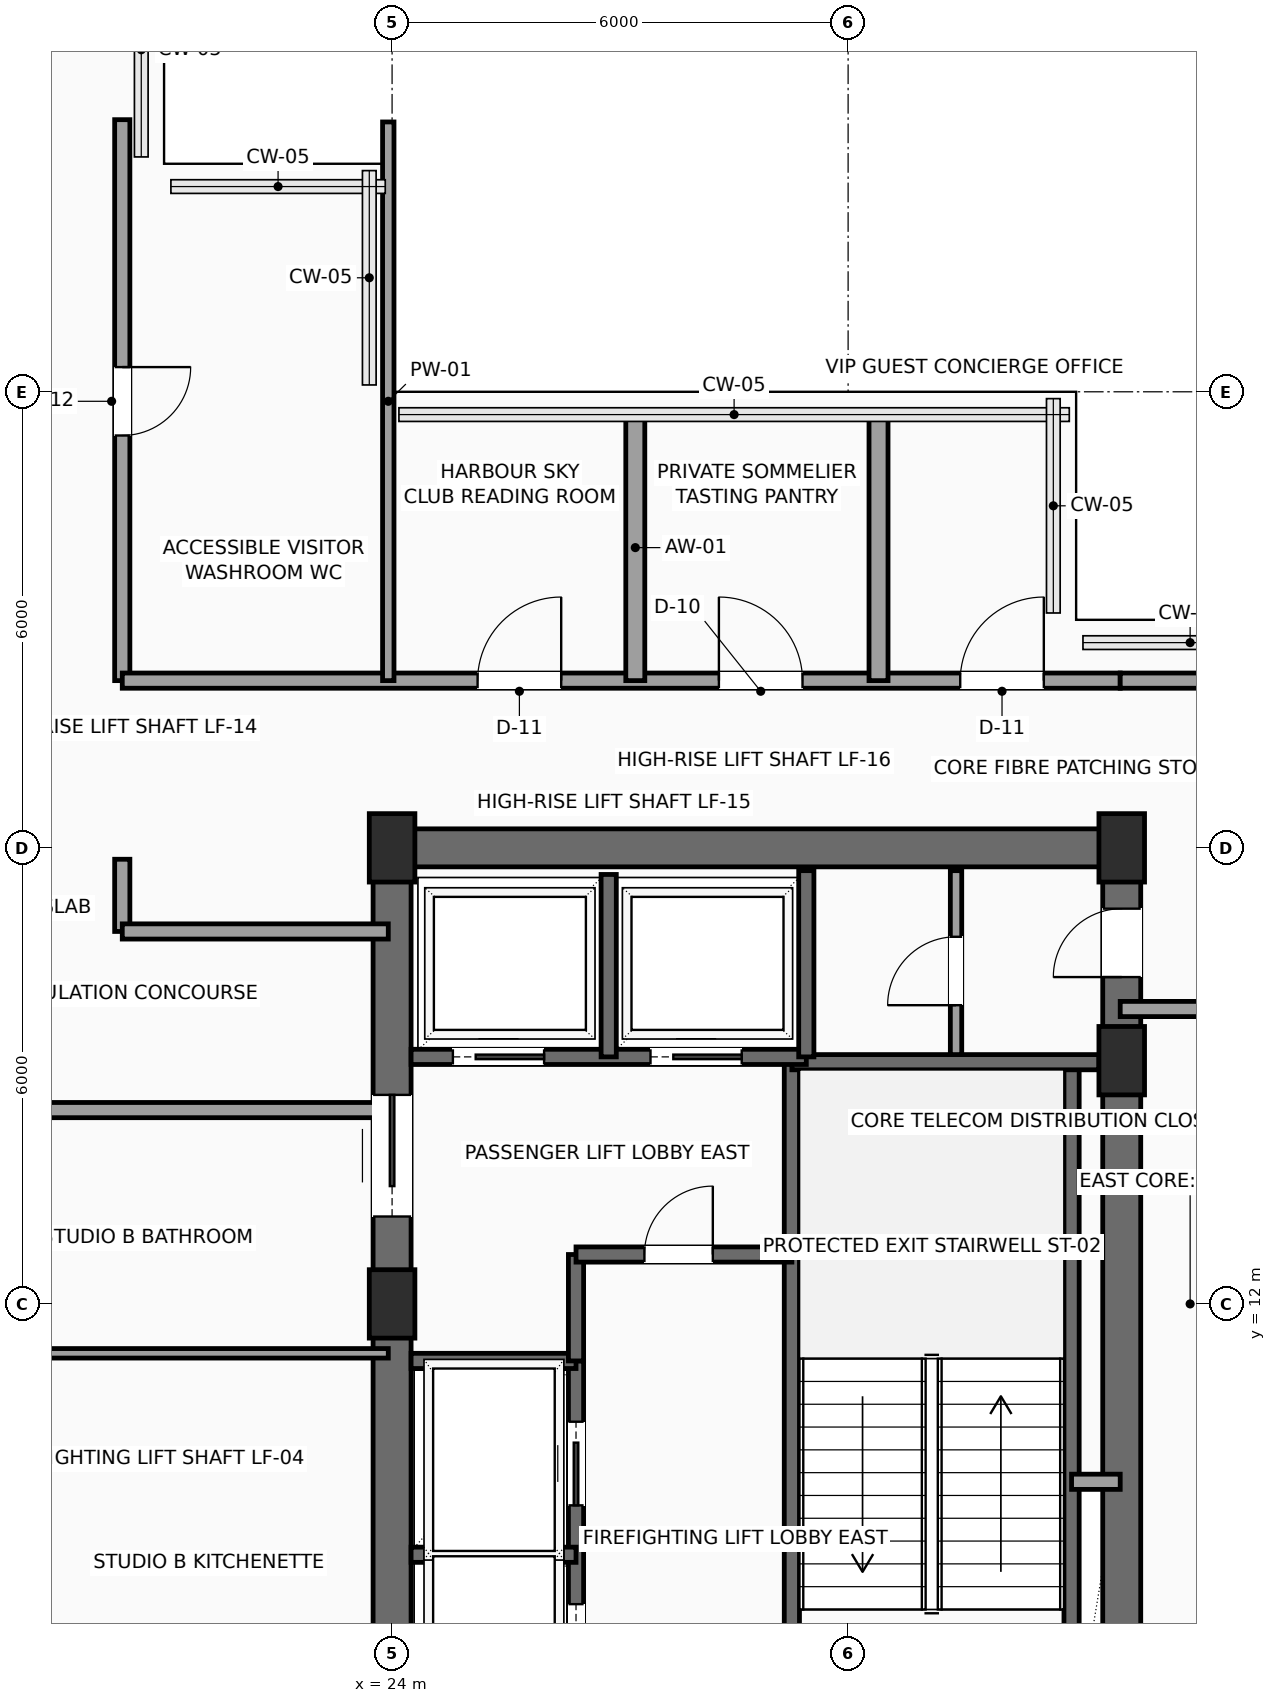
"""IFC4 building model, lengths in metres.
Left out: names, types, materials, properties, quantities, classifications, styles, units other than length and angle.
Written with IfcOpenShell. Run it as: python <this file> out.ifc"""

import sys

from ifc_helpers import new_model, si_unit, direction, frame, frame_2d, origin, origin_2d, place, context, subcontext, project, spatial, rectangle, extrude, element, fill, save


model = new_model("IFC4")
c1 = context("Model", 3, precision=1e-05, world=origin(), true_north=direction((0.0, 1.0)))
c2 = subcontext(c1, "Body", "Model", "MODEL_VIEW")
j1 = project(units=[si_unit("LENGTHUNIT", "METRE"), si_unit("PLANEANGLEUNIT", "RADIAN")], contexts=[c1])
p1 = place(None, origin())
s1 = spatial("IfcSite", under=j1, at=p1, CompositionType="ELEMENT")
p2 = place(p1, origin())
s2 = spatial("IfcBuilding", under=s1, at=p2, CompositionType="ELEMENT")
p3 = place(p2, frame((0.0, 0.0, 246.7)))
s3 = spatial("IfcBuildingStorey", under=s2, at=p3, CompositionType="ELEMENT", Elevation=246.7)
for number, where, z_axis, x_axis in (
    (1, (24.0, 12.0, 0.0), (0.0, 0.0, 1.0), (1.0, 0.0, 0.0)),
    (2, (24.0, 18.0, 0.0), (0.0, 0.0, 1.0), (1.0, 0.0, 0.0)),
    (3, (33.6, 15.2, 0.0), (0.0, 0.0, 1.0), (1.0, 0.0, 0.0)),
    (4, (33.6, 18.0, 0.0), (0.0, 0.0, 1.0), (1.0, 0.0, 0.0)),
):
    element("IfcColumn", number, at=place(p3, frame(where, z_axis=z_axis, x_axis=x_axis)), inside=s3, PredefinedType="COLUMN", context=c2, shape_type="SweptSolid", body=[
        extrude(rectangle(XDim=0.6, YDim=0.9, at=origin_2d()), origin(), (0.0, 0.0, 1.0), 3.5),
    ])
p4 = place(p3, frame((24.0, 18.0, 0.0), z_axis=(0.0, 0.0, 1.0), x_axis=(1.0, 0.0, 0.0)))
e5 = element("IfcWall", 5, at=p4, inside=s3, PredefinedType="SHEAR", context=c2, shape_type="SweptSolid", body=[
    extrude(rectangle(XDim=9.6, YDim=0.5, at=frame_2d((4.8, 0.0))), origin(), (0.0, 0.0, 1.0), 3.3),
])
p5 = place(p3, frame((24.0, 6.0, 0.0), z_axis=(0.0, 0.0, 1.0), x_axis=(0.0, 1.0, 0.0)))
e6 = element("IfcWall", 6, at=p5, inside=s3, PredefinedType="SHEAR", context=c2, shape_type="SweptSolid", body=[
    extrude(rectangle(XDim=12.0, YDim=0.5, at=frame_2d((6.0, 0.0))), origin(), (0.0, 0.0, 1.0), 3.3),
])
p6 = place(p5, frame((7.15, 0.0, 0.0)))
e7 = element("IfcOpeningElement", 7, at=p6, cuts=e6, PredefinedType="OPENING", context=c2, shape_type="SweptSolid", body=[
    extrude(rectangle(XDim=1.6, YDim=2.3, at=frame_2d((0.8, 1.15))), frame((0.0, 0.26, 0.0), z_axis=(0.0, -1.0, 0.0), x_axis=(1.0, 0.0, 0.0)), (0.0, 0.0, 1.0), 0.52),
])
p7 = place(p3, frame((33.6, 6.0, 0.0), z_axis=(0.0, 0.0, 1.0), x_axis=(0.0, 1.0, 0.0)))
e8 = element("IfcWall", 8, at=p7, inside=s3, PredefinedType="SHEAR", context=c2, shape_type="SweptSolid", body=[
    extrude(rectangle(XDim=12.0, YDim=0.5, at=frame_2d((6.0, 0.0))), origin(), (0.0, 0.0, 1.0), 3.3),
])
p8 = place(p7, frame((10.3, 0.0, 0.0)))
e9 = element("IfcOpeningElement", 9, at=p8, cuts=e8, PredefinedType="OPENING", context=c2, shape_type="SweptSolid", body=[
    extrude(rectangle(XDim=0.9, YDim=2.15, at=frame_2d((0.45, 1.075))), frame((0.0, 0.26, 0.0), z_axis=(0.0, -1.0, 0.0), x_axis=(1.0, 0.0, 0.0)), (0.0, 0.0, 1.0), 0.52),
])
p9 = place(p3, frame((29.26, 6.3, 0.0), z_axis=(0.0, 0.0, 1.0), x_axis=(0.0, 1.0, 0.0)))
e10 = element("IfcWall", 10, at=p9, inside=s3, PredefinedType="SHEAR", context=c2, shape_type="SweptSolid", body=[
    extrude(rectangle(XDim=8.88, YDim=0.2, at=frame_2d((4.44, 0.0))), origin(), (0.0, 0.0, 1.0), 3.3),
])
p10 = place(p9, frame((0.35, 0.0, 0.0)))
e11 = element("IfcOpeningElement", 11, at=p10, cuts=e10, PredefinedType="OPENING", context=c2, shape_type="SweptSolid", body=[
    extrude(rectangle(XDim=1.1, YDim=2.2, at=frame_2d((0.55, 1.1))), frame((0.0, 0.11, 0.0), z_axis=(0.0, -1.0, 0.0), x_axis=(1.0, 0.0, 0.0)), (0.0, 0.0, 1.0), 0.22),
])
p11 = place(p3, frame((32.94, 6.3, 0.0), z_axis=(0.0, 0.0, 1.0), x_axis=(0.0, 1.0, 0.0)))
e12 = element("IfcWall", 12, at=p11, inside=s3, PredefinedType="SHEAR", context=c2, shape_type="SweptSolid", body=[
    extrude(rectangle(XDim=8.88, YDim=0.2, at=frame_2d((4.44, 0.0))), origin(), (0.0, 0.0, 1.0), 3.3),
])
p12 = place(p3, frame((29.26, 15.18, 0.0), z_axis=(0.0, 0.0, 1.0), x_axis=(1.0, 0.0, 0.0)))
e13 = element("IfcWall", 13, at=p12, inside=s3, PredefinedType="SHEAR", context=c2, shape_type="SweptSolid", body=[
    extrude(rectangle(XDim=4.04, YDim=0.2, at=frame_2d((2.02, 0.0))), origin(), (0.0, 0.0, 1.0), 3.3),
])
p13 = place(p3, frame((26.42, 6.3, 0.0), z_axis=(0.0, 0.0, 1.0), x_axis=(0.0, 1.0, 0.0)))
e14 = element("IfcWall", 14, at=p13, inside=s3, PredefinedType="SHEAR", context=c2, shape_type="SweptSolid", body=[
    extrude(rectangle(XDim=4.95, YDim=0.2, at=frame_2d((2.475, 0.0))), origin(), (0.0, 0.0, 1.0), 3.3),
])
p14 = place(p13, frame((0.65, 0.0, 0.0)))
e15 = element("IfcOpeningElement", 15, at=p14, cuts=e14, PredefinedType="OPENING", context=c2, shape_type="SweptSolid", body=[
    extrude(rectangle(XDim=1.1, YDim=2.2, at=frame_2d((0.55, 1.1))), frame((0.0, 0.11, 0.0), z_axis=(0.0, -1.0, 0.0), x_axis=(1.0, 0.0, 0.0)), (0.0, 0.0, 1.0), 0.22),
])
p15 = place(p13, frame((3.05, 0.0, 0.0)))
e16 = element("IfcOpeningElement", 16, at=p15, cuts=e14, PredefinedType="OPENING", context=c2, shape_type="SweptSolid", body=[
    extrude(rectangle(XDim=1.1, YDim=2.2, at=frame_2d((0.55, 1.1))), frame((0.0, 0.11, 0.0), z_axis=(0.0, -1.0, 0.0), x_axis=(1.0, 0.0, 0.0)), (0.0, 0.0, 1.0), 0.22),
])
for number, where, z_axis, x_axis in (
    (17, (24.25, 8.7, 0.0), (0.0, 0.0, 1.0), (1.0, 0.0, 0.0)),
    (18, (24.25, 11.25, 0.0), (0.0, 0.0, 1.0), (1.0, 0.0, 0.0)),
):
    element("IfcWall", number, at=place(p3, frame(where, z_axis=z_axis, x_axis=x_axis)), inside=s3, PredefinedType="SHEAR", context=c2, shape_type="SweptSolid", body=[
        extrude(rectangle(XDim=2.17, YDim=0.2, at=frame_2d((1.085, 0.0))), origin(), (0.0, 0.0, 1.0), 3.3),
    ])
p16 = place(p3, frame((26.42, 11.25, 0.0), z_axis=(0.0, 0.0, 1.0), x_axis=(0.0, 1.0, 0.0)))
e19 = element("IfcWall", 19, at=p16, inside=s3, PredefinedType="SHEAR", context=c2, shape_type="SweptSolid", body=[
    extrude(rectangle(XDim=1.4, YDim=0.2, at=frame_2d((0.7, 0.0))), origin(), (0.0, 0.0, 1.0), 3.3),
])
p17 = place(p3, frame((26.42, 12.65, 0.0), z_axis=(0.0, 0.0, 1.0), x_axis=(1.0, 0.0, 0.0)))
e20 = element("IfcWall", 20, at=p17, inside=s3, PredefinedType="SHEAR", context=c2, shape_type="SweptSolid", body=[
    extrude(rectangle(XDim=2.84, YDim=0.2, at=frame_2d((1.42, 0.0))), origin(), (0.0, 0.0, 1.0), 3.3),
])
p18 = place(p17, frame((0.9, 0.0, 0.0)))
e21 = element("IfcOpeningElement", 21, at=p18, cuts=e20, PredefinedType="OPENING", context=c2, shape_type="SweptSolid", body=[
    extrude(rectangle(XDim=0.9, YDim=2.15, at=frame_2d((0.45, 1.075))), frame((0.0, 0.11, 0.0), z_axis=(0.0, -1.0, 0.0), x_axis=(1.0, 0.0, 0.0)), (0.0, 0.0, 1.0), 0.22),
])
p19 = place(p3, frame((32.94, 9.66, 0.0), z_axis=(0.0, 0.0, 1.0), x_axis=(1.0, 0.0, 0.0)))
e22 = element("IfcWall", 22, at=p19, inside=s3, PredefinedType="SOLIDWALL", context=c2, shape_type="SweptSolid", body=[
    extrude(rectangle(XDim=0.64, YDim=0.2, at=frame_2d((0.32, 0.0))), origin(), (0.0, 0.0, 1.0), 3.3),
])
p20 = place(p3, frame((24.25, 15.25, 0.0), z_axis=(0.0, 0.0, 1.0), x_axis=(1.0, 0.0, 0.0)))
e23 = element("IfcWall", 23, at=p20, inside=s3, PredefinedType="SHEAR", context=c2, shape_type="SweptSolid", body=[
    extrude(rectangle(XDim=5.2, YDim=0.2, at=frame_2d((2.6, 0.0))), origin(), (0.0, 0.0, 1.0), 3.3),
])
p21 = place(p20, frame((0.55, 0.0, 0.0)))
e24 = element("IfcOpeningElement", 24, at=p21, cuts=e23, PredefinedType="OPENING", context=c2, shape_type="SweptSolid", body=[
    extrude(rectangle(XDim=1.2, YDim=2.2, at=frame_2d((0.6, 1.1))), frame((0.0, 0.11, 0.0), z_axis=(0.0, -1.0, 0.0), x_axis=(1.0, 0.0, 0.0)), (0.0, 0.0, 1.0), 0.22),
])
p22 = place(p20, frame((3.15, 0.0, 0.0)))
e25 = element("IfcOpeningElement", 25, at=p22, cuts=e23, PredefinedType="OPENING", context=c2, shape_type="SweptSolid", body=[
    extrude(rectangle(XDim=1.2, YDim=2.2, at=frame_2d((0.6, 1.1))), frame((0.0, 0.11, 0.0), z_axis=(0.0, -1.0, 0.0), x_axis=(1.0, 0.0, 0.0)), (0.0, 0.0, 1.0), 0.22),
])
p23 = place(p3, frame((26.85, 15.25, 0.0), z_axis=(0.0, 0.0, 1.0), x_axis=(0.0, 1.0, 0.0)))
e26 = element("IfcWall", 26, at=p23, inside=s3, PredefinedType="SHEAR", context=c2, shape_type="SweptSolid", body=[
    extrude(rectangle(XDim=2.4, YDim=0.2, at=frame_2d((1.2, 0.0))), origin(), (0.0, 0.0, 1.0), 3.3),
])
p24 = place(p3, frame((29.45, 15.25, 0.0), z_axis=(0.0, 0.0, 1.0), x_axis=(0.0, 1.0, 0.0)))
e27 = element("IfcWall", 27, at=p24, inside=s3, PredefinedType="SHEAR", context=c2, shape_type="SweptSolid", body=[
    extrude(rectangle(XDim=2.45, YDim=0.2, at=frame_2d((1.225, 0.0))), origin(), (0.0, 0.0, 1.0), 3.3),
])
p25 = place(p3, frame((31.42, 15.28, 0.0), z_axis=(0.0, 0.0, 1.0), x_axis=(0.0, 1.0, 0.0)))
e28 = element("IfcWall", 28, at=p25, inside=s3, PredefinedType="PARTITIONING", context=c2, shape_type="SweptSolid", body=[
    extrude(rectangle(XDim=2.42, YDim=0.15, at=frame_2d((1.21, 0.0))), origin(), (0.0, 0.0, 1.0), 3.3),
])
p26 = place(p25, frame((0.65, 0.0, 0.0)))
e29 = element("IfcOpeningElement", 29, at=p26, cuts=e28, PredefinedType="OPENING", context=c2, shape_type="SweptSolid", body=[
    extrude(rectangle(XDim=0.9, YDim=2.15, at=frame_2d((0.45, 1.075))), frame((0.0, 0.085, 0.0), z_axis=(0.0, -1.0, 0.0), x_axis=(1.0, 0.0, 0.0)), (0.0, 0.0, 1.0), 0.17),
])
p27 = place(p3, frame((20.45, 27.58, 0.0), z_axis=(0.0, 0.0, 1.0), x_axis=(0.0, -1.0, 0.0)))
e30 = element("IfcWall", 30, at=p27, inside=s3, PredefinedType="PARTITIONING", context=c2, shape_type="SweptSolid", body=[
    extrude(rectangle(XDim=7.38, YDim=0.2, at=frame_2d((3.69, 0.0))), origin(), (0.0, 0.0, 1.0), 3.3),
])
p28 = place(p27, frame((3.255, 0.0, 0.0)))
e31 = element("IfcOpeningElement", 31, at=p28, cuts=e30, PredefinedType="OPENING", context=c2, shape_type="SweptSolid", body=[
    extrude(rectangle(XDim=0.9, YDim=2.1, at=frame_2d((0.45, 1.05))), frame((0.0, 0.11, 0.0), z_axis=(0.0, -1.0, 0.0), x_axis=(1.0, 0.0, 0.0)), (0.0, 0.0, 1.0), 0.22),
])
p29 = place(p3, frame((20.45, 20.2, 0.0), z_axis=(0.0, 0.0, 1.0), x_axis=(1.0, 0.0, 0.0)))
e32 = element("IfcWall", 32, at=p29, inside=s3, PredefinedType="PARTITIONING", context=c2, shape_type="SweptSolid", body=[
    extrude(rectangle(XDim=13.13, YDim=0.2, at=frame_2d((6.565, 0.0))), origin(), (0.0, 0.0, 1.0), 3.3),
])
p30 = place(p29, frame((4.675, 0.0, 0.0)))
e33 = element("IfcOpeningElement", 33, at=p30, cuts=e32, PredefinedType="OPENING", context=c2, shape_type="SweptSolid", body=[
    extrude(rectangle(XDim=1.1, YDim=2.25, at=frame_2d((0.55, 1.125))), frame((0.0, 0.11, 0.0), z_axis=(0.0, -1.0, 0.0), x_axis=(1.0, 0.0, 0.0)), (0.0, 0.0, 1.0), 0.22),
])
p31 = place(p29, frame((7.85, 0.0, 0.0)))
e34 = element("IfcOpeningElement", 34, at=p31, cuts=e32, PredefinedType="OPENING", context=c2, shape_type="SweptSolid", body=[
    extrude(rectangle(XDim=1.1, YDim=2.25, at=frame_2d((0.55, 1.125))), frame((0.0, 0.11, 0.0), z_axis=(0.0, -1.0, 0.0), x_axis=(1.0, 0.0, 0.0)), (0.0, 0.0, 1.0), 0.22),
])
p32 = place(p29, frame((11.025, 0.0, 0.0)))
e35 = element("IfcOpeningElement", 35, at=p32, cuts=e32, PredefinedType="OPENING", context=c2, shape_type="SweptSolid", body=[
    extrude(rectangle(XDim=1.1, YDim=2.25, at=frame_2d((0.55, 1.125))), frame((0.0, 0.11, 0.0), z_axis=(0.0, -1.0, 0.0), x_axis=(1.0, 0.0, 0.0)), (0.0, 0.0, 1.0), 0.22),
])
for number, where, z_axis, x_axis in (
    (36, (33.58, 20.2, 0.0), (0.0, 0.0, 1.0), (1.0, 0.0, 0.0)),
    (37, (35.7, 15.88, 0.0), (0.0, 0.0, 1.0), (-1.0, 0.0, 0.0)),
):
    element("IfcWall", number, at=place(p3, frame(where, z_axis=z_axis, x_axis=x_axis)), inside=s3, PredefinedType="PARTITIONING", context=c2, shape_type="SweptSolid", body=[
        extrude(rectangle(XDim=2.12, YDim=0.2, at=frame_2d((1.06, 0.0))), origin(), (0.0, 0.0, 1.0), 3.3),
    ])
p33 = place(p3, frame((20.45, 17.85, 0.0), z_axis=(0.0, 0.0, 1.0), x_axis=(0.0, -1.0, 0.0)))
e38 = element("IfcWall", 38, at=p33, inside=s3, PredefinedType="PARTITIONING", context=c2, shape_type="SweptSolid", body=[
    extrude(rectangle(XDim=0.95, YDim=0.2, at=frame_2d((0.475, 0.0))), origin(), (0.0, 0.0, 1.0), 3.3),
])
p34 = place(p3, frame((20.45, 16.9, 0.0), z_axis=(0.0, 0.0, 1.0), x_axis=(1.0, 0.0, 0.0)))
e39 = element("IfcWall", 39, at=p34, inside=s3, PredefinedType="PARTITIONING", context=c2, shape_type="SweptSolid", body=[
    extrude(rectangle(XDim=3.5, YDim=0.2, at=frame_2d((1.75, 0.0))), origin(), (0.0, 0.0, 1.0), 3.3),
])
p35 = place(p3, frame((23.95, 14.55, 0.0), z_axis=(0.0, 0.0, 1.0), x_axis=(-1.0, 0.0, 0.0)))
e40 = element("IfcWall", 40, at=p35, inside=s3, PredefinedType="PARTITIONING", context=c2, shape_type="SweptSolid", body=[
    extrude(rectangle(XDim=9.0, YDim=0.2, at=frame_2d((4.5, 0.0))), origin(), (0.0, 0.0, 1.0), 3.3),
])
p36 = place(p35, frame((6.925, 0.0, 0.0)))
e41 = element("IfcOpeningElement", 41, at=p36, cuts=e40, PredefinedType="OPENING", context=c2, shape_type="SweptSolid", body=[
    extrude(rectangle(XDim=1.0, YDim=2.2, at=frame_2d((0.5, 1.1))), frame((0.0, 0.11, 0.0), z_axis=(0.0, -1.0, 0.0), x_axis=(1.0, 0.0, 0.0)), (0.0, 0.0, 1.0), 0.22),
])
p37 = place(p3, frame((23.95, 20.2, 0.0), z_axis=(0.0, 0.0, 1.0), x_axis=(0.0, 1.0, 0.0)))
e42 = element("IfcWall", 42, at=p37, inside=s3, PredefinedType="PARTITIONING", context=c2, shape_type="SweptSolid", body=[
    extrude(rectangle(XDim=7.35, YDim=0.15, at=frame_2d((3.675, 0.0))), origin(), (0.0, 0.0, 1.0), 3.3),
])
for number, where, z_axis, x_axis in (
    (43, (27.2, 20.2, 0.0), (0.0, 0.0, 1.0), (0.0, 1.0, 0.0)),
    (44, (30.4, 20.2, 0.0), (0.0, 0.0, 1.0), (0.0, 1.0, 0.0)),
):
    element("IfcWall", number, at=place(p3, frame(where, z_axis=z_axis, x_axis=x_axis)), inside=s3, PredefinedType="PARTITIONING", context=c2, shape_type="SweptSolid", body=[
        extrude(rectangle(XDim=3.5, YDim=0.25, at=frame_2d((1.75, 0.0))), origin(), (0.0, 0.0, 1.0), 3.3),
    ])
p38 = place(p3, frame((18.0, 11.35, 0.0), z_axis=(0.0, 0.0, 1.0), x_axis=(1.0, 0.0, 0.0)))
e45 = element("IfcWall", 45, at=p38, inside=s3, PredefinedType="PARTITIONING", context=c2, shape_type="SweptSolid", body=[
    extrude(rectangle(XDim=5.95, YDim=0.125, at=frame_2d((2.975, 0.0))), origin(), (0.0, 0.0, 1.0), 3.3),
])
p39 = place(p6, origin())
e46 = element("IfcDoor", 46, at=p39, inside=s3, OperationType="DOUBLE_DOOR_SLIDING", PredefinedType="DOOR", context=c2, shape_type="SweptSolid", body=[
    extrude(rectangle(XDim=1.6, YDim=2.3, at=frame_2d((0.8, 1.15))), frame((0.0, 0.025, 0.0), z_axis=(0.0, -1.0, 0.0), x_axis=(1.0, 0.0, 0.0)), (0.0, 0.0, 1.0), 0.05),
])
fill(e7, e46)
p40 = place(p8, origin())
e47 = element("IfcDoor", 47, at=p40, inside=s3, OperationType="SINGLE_SWING_LEFT", PredefinedType="DOOR", context=c2, shape_type="SweptSolid", body=[
    extrude(rectangle(XDim=0.9, YDim=2.15, at=frame_2d((0.45, 1.075))), frame((0.0, 0.025, 0.0), z_axis=(0.0, -1.0, 0.0), x_axis=(1.0, 0.0, 0.0)), (0.0, 0.0, 1.0), 0.05),
])
fill(e9, e47)
p41 = place(p14, origin())
e48 = element("IfcDoor", 48, at=p41, inside=s3, OperationType="SLIDING_TO_LEFT", PredefinedType="DOOR", context=c2, shape_type="SweptSolid", body=[
    extrude(rectangle(XDim=1.1, YDim=2.2, at=frame_2d((0.55, 1.1))), frame((0.0, 0.025, 0.0), z_axis=(0.0, -1.0, 0.0), x_axis=(1.0, 0.0, 0.0)), (0.0, 0.0, 1.0), 0.05),
])
fill(e15, e48)
p42 = place(p15, origin())
e49 = element("IfcDoor", 49, at=p42, inside=s3, OperationType="SLIDING_TO_LEFT", PredefinedType="DOOR", context=c2, shape_type="SweptSolid", body=[
    extrude(rectangle(XDim=1.1, YDim=2.2, at=frame_2d((0.55, 1.1))), frame((0.0, 0.025, 0.0), z_axis=(0.0, -1.0, 0.0), x_axis=(1.0, 0.0, 0.0)), (0.0, 0.0, 1.0), 0.05),
])
fill(e16, e49)
p43 = place(p18, origin())
e50 = element("IfcDoor", 50, at=p43, inside=s3, OperationType="SINGLE_SWING_RIGHT", PredefinedType="DOOR", context=c2, shape_type="SweptSolid", body=[
    extrude(rectangle(XDim=0.9, YDim=2.15, at=frame_2d((0.45, 1.075))), frame((0.0, 0.025, 0.0), z_axis=(0.0, -1.0, 0.0), x_axis=(1.0, 0.0, 0.0)), (0.0, 0.0, 1.0), 0.05),
])
fill(e21, e50)
p44 = place(p21, origin())
e51 = element("IfcDoor", 51, at=p44, inside=s3, OperationType="SLIDING_TO_RIGHT", PredefinedType="DOOR", context=c2, shape_type="SweptSolid", body=[
    extrude(rectangle(XDim=1.2, YDim=2.2, at=frame_2d((0.6, 1.1))), frame((0.0, 0.025, 0.0), z_axis=(0.0, -1.0, 0.0), x_axis=(1.0, 0.0, 0.0)), (0.0, 0.0, 1.0), 0.05),
])
fill(e24, e51)
p45 = place(p22, origin())
e52 = element("IfcDoor", 52, at=p45, inside=s3, OperationType="SLIDING_TO_RIGHT", PredefinedType="DOOR", context=c2, shape_type="SweptSolid", body=[
    extrude(rectangle(XDim=1.2, YDim=2.2, at=frame_2d((0.6, 1.1))), frame((0.0, 0.025, 0.0), z_axis=(0.0, -1.0, 0.0), x_axis=(1.0, 0.0, 0.0)), (0.0, 0.0, 1.0), 0.05),
])
fill(e25, e52)
p46 = place(p26, origin())
e53 = element("IfcDoor", 53, at=p46, inside=s3, OperationType="SINGLE_SWING_LEFT", PredefinedType="DOOR", context=c2, shape_type="SweptSolid", body=[
    extrude(rectangle(XDim=0.9, YDim=2.15, at=frame_2d((0.45, 1.075))), frame((0.0, 0.025, 0.0), z_axis=(0.0, -1.0, 0.0), x_axis=(1.0, 0.0, 0.0)), (0.0, 0.0, 1.0), 0.05),
])
fill(e29, e53)
p47 = place(p28, origin())
e54 = element("IfcDoor", 54, at=p47, inside=s3, OperationType="SINGLE_SWING_LEFT", PredefinedType="DOOR", context=c2, shape_type="SweptSolid", body=[
    extrude(rectangle(XDim=0.9, YDim=2.1, at=frame_2d((0.45, 1.05))), frame((0.0, 0.025, 0.0), z_axis=(0.0, -1.0, 0.0), x_axis=(1.0, 0.0, 0.0)), (0.0, 0.0, 1.0), 0.05),
])
fill(e31, e54)
p48 = place(p30, origin())
e55 = element("IfcDoor", 55, at=p48, inside=s3, OperationType="SINGLE_SWING_RIGHT", PredefinedType="DOOR", context=c2, shape_type="SweptSolid", body=[
    extrude(rectangle(XDim=1.1, YDim=2.25, at=frame_2d((0.55, 1.125))), frame((0.0, 0.025, 0.0), z_axis=(0.0, -1.0, 0.0), x_axis=(1.0, 0.0, 0.0)), (0.0, 0.0, 1.0), 0.05),
])
fill(e33, e55)
p49 = place(p31, origin())
e56 = element("IfcDoor", 56, at=p49, inside=s3, OperationType="SINGLE_SWING_LEFT", PredefinedType="DOOR", context=c2, shape_type="SweptSolid", body=[
    extrude(rectangle(XDim=1.1, YDim=2.25, at=frame_2d((0.55, 1.125))), frame((0.0, 0.025, 0.0), z_axis=(0.0, -1.0, 0.0), x_axis=(1.0, 0.0, 0.0)), (0.0, 0.0, 1.0), 0.05),
])
fill(e34, e56)
p50 = place(p32, origin())
e57 = element("IfcDoor", 57, at=p50, inside=s3, OperationType="SINGLE_SWING_RIGHT", PredefinedType="DOOR", context=c2, shape_type="SweptSolid", body=[
    extrude(rectangle(XDim=1.1, YDim=2.25, at=frame_2d((0.55, 1.125))), frame((0.0, 0.025, 0.0), z_axis=(0.0, -1.0, 0.0), x_axis=(1.0, 0.0, 0.0)), (0.0, 0.0, 1.0), 0.05),
])
fill(e35, e57)
save(model, sys.argv[1])
